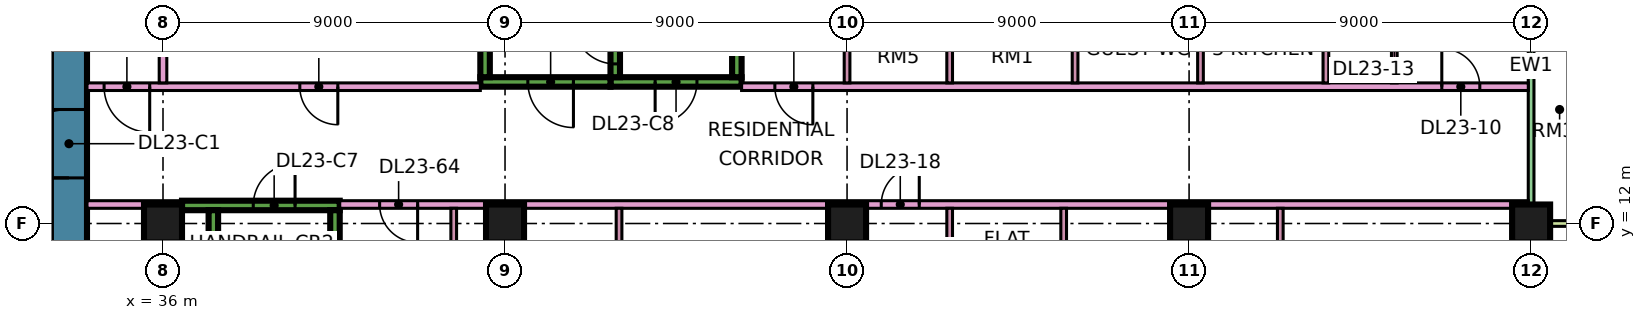
"""IFC4 building model, lengths in metres.
Left out: names, types, materials, properties, quantities, classifications, styles, units other than length and angle.
Written with IfcOpenShell. Run it as: python <this file> out.ifc"""

import sys

from ifc_helpers import new_model, si_unit, direction, frame, frame_2d, origin, origin_2d, place, context, subcontext, project, spatial, rectangle, extrude, element, fill, save


model = new_model("IFC4")
c1 = context("Model", 3, precision=1e-05, world=origin(), true_north=direction((0.0, 1.0)))
c2 = subcontext(c1, "Body", "Model", "MODEL_VIEW")
j1 = project(units=[si_unit("LENGTHUNIT", "METRE"), si_unit("PLANEANGLEUNIT", "RADIAN")], contexts=[c1])
p1 = place(None, origin())
s1 = spatial("IfcSite", under=j1, at=p1, CompositionType="ELEMENT")
p2 = place(p1, origin())
s2 = spatial("IfcBuilding", under=s1, at=p2, CompositionType="ELEMENT")
p3 = place(p2, frame((0.0, 0.0, 103.15)))
s3 = spatial("IfcBuildingStorey", under=s2, at=p3, CompositionType="ELEMENT", Elevation=103.15)
for number, where, z_axis, x_axis in (
    (1, (36.0, 12.0, 0.0), (0.0, 0.0, 1.0), (1.0, 0.0, 0.0)),
    (2, (45.0, 12.0, 0.0), (0.0, 0.0, 1.0), (1.0, 0.0, 0.0)),
    (3, (54.0, 12.0, 0.0), (0.0, 0.0, 1.0), (1.0, 0.0, 0.0)),
    (4, (63.0, 12.0, 0.0), (0.0, 0.0, 1.0), (1.0, 0.0, 0.0)),
    (5, (72.0, 12.0, 0.0), (0.0, 0.0, 1.0), (1.0, 0.0, 0.0)),
):
    element("IfcColumn", number, at=place(p3, frame(where, z_axis=z_axis, x_axis=x_axis)), inside=s3, PredefinedType="COLUMN", context=c2, shape_type="SweptSolid", body=[
        extrude(rectangle(XDim=1.0, YDim=1.0, at=origin_2d()), origin(), (0.0, 0.0, 1.0), 3.75),
    ])
p4 = place(p3, frame((33.525, 7.95, 0.0), z_axis=(0.0, 0.0, 1.0), x_axis=(0.0, 1.0, 0.0)))
e6 = element("IfcWall", 6, at=p4, inside=s3, PredefinedType="SHEAR", context=c2, shape_type="SweptSolid", body=[
    extrude(rectangle(XDim=11.1, YDim=0.95, at=frame_2d((5.55, 0.0))), origin(), (0.0, 0.0, 1.0), 3.75),
])
p5 = place(p4, frame((5.25, 0.0, 0.0)))
e7 = element("IfcOpeningElement", 7, at=p5, cuts=e6, PredefinedType="OPENING", context=c2, shape_type="SweptSolid", body=[
    extrude(rectangle(XDim=1.8, YDim=2.4, at=frame_2d((0.9, 1.2))), frame((0.0, 0.485, 0.0), z_axis=(0.0, -1.0, 0.0), x_axis=(1.0, 0.0, 0.0)), (0.0, 0.0, 1.0), 0.97),
])
p6 = place(p3, frame((36.5, 12.475, 0.0), z_axis=(0.0, 0.0, 1.0), x_axis=(1.0, 0.0, 0.0)))
e8 = element("IfcWall", 8, at=p6, inside=s3, PredefinedType="SHEAR", context=c2, shape_type="SweptSolid", body=[
    extrude(rectangle(XDim=4.15, YDim=0.25, at=frame_2d((2.075, 0.0))), origin(), (0.0, 0.0, 1.0), 3.75),
])
p7 = place(p6, frame((1.875, 0.0, 0.0)))
e9 = element("IfcOpeningElement", 9, at=p7, cuts=e8, PredefinedType="OPENING", context=c2, shape_type="SweptSolid", body=[
    extrude(rectangle(XDim=1.1, YDim=2.2, at=frame_2d((0.55, 1.1))), frame((0.0, 0.135, 0.0), z_axis=(0.0, -1.0, 0.0), x_axis=(1.0, 0.0, 0.0)), (0.0, 0.0, 1.0), 0.27),
])
for number, where, z_axis, x_axis in (
    (10, (37.325, 5.85, 0.0), (0.0, 0.0, 1.0), (0.0, 1.0, 0.0)),
    (11, (40.525, 5.85, 0.0), (0.0, 0.0, 1.0), (0.0, 1.0, 0.0)),
):
    element("IfcWall", number, at=place(p3, frame(where, z_axis=z_axis, x_axis=x_axis)), inside=s3, PredefinedType="SHEAR", context=c2, shape_type="SweptSolid", body=[
        extrude(rectangle(XDim=6.5, YDim=0.25, at=frame_2d((3.25, 0.0))), origin(), (0.0, 0.0, 1.0), 3.75),
    ])
p8 = place(p3, frame((47.775, 15.725, 0.0), z_axis=(0.0, 0.0, 1.0), x_axis=(1.0, 0.0, 0.0)))
e12 = element("IfcWall", 12, at=p8, inside=s3, PredefinedType="SHEAR", context=c2, shape_type="SweptSolid", body=[
    extrude(rectangle(XDim=3.45, YDim=0.25, at=frame_2d((1.725, 0.0))), origin(), (0.0, 0.0, 1.0), 3.75),
])
p9 = place(p8, frame((1.175, 0.0, 0.0)))
e13 = element("IfcOpeningElement", 13, at=p9, cuts=e12, PredefinedType="OPENING", context=c2, shape_type="SweptSolid", body=[
    extrude(rectangle(XDim=1.1, YDim=2.2, at=frame_2d((0.55, 1.1))), frame((0.0, 0.135, 0.0), z_axis=(0.0, -1.0, 0.0), x_axis=(1.0, 0.0, 0.0)), (0.0, 0.0, 1.0), 0.27),
])
p10 = place(p3, frame((47.9, 15.85, 0.0), z_axis=(0.0, 0.0, 1.0), x_axis=(0.0, 1.0, 0.0)))
e14 = element("IfcWall", 14, at=p10, inside=s3, PredefinedType="SHEAR", context=c2, shape_type="SweptSolid", body=[
    extrude(rectangle(XDim=6.5, YDim=0.25, at=frame_2d((3.25, 0.0))), origin(), (0.0, 0.0, 1.0), 3.75),
])
p11 = place(p10, frame((0.35, 0.0, 0.0)))
e15 = element("IfcOpeningElement", 15, at=p11, cuts=e14, PredefinedType="OPENING", context=c2, shape_type="SweptSolid", body=[
    extrude(rectangle(XDim=1.1, YDim=2.2, at=frame_2d((0.55, 1.1))), frame((0.0, 0.135, 0.0), z_axis=(0.0, -1.0, 0.0), x_axis=(1.0, 0.0, 0.0)), (0.0, 0.0, 1.0), 0.27),
])
p12 = place(p3, frame((51.1, 15.85, 0.0), z_axis=(0.0, 0.0, 1.0), x_axis=(0.0, 1.0, 0.0)))
e16 = element("IfcWall", 16, at=p12, inside=s3, PredefinedType="SHEAR", context=c2, shape_type="SweptSolid", body=[
    extrude(rectangle(XDim=6.5, YDim=0.25, at=frame_2d((3.25, 0.0))), origin(), (0.0, 0.0, 1.0), 3.75),
])
p13 = place(p3, frame((44.35, 15.725, 0.0), z_axis=(0.0, 0.0, 1.0), x_axis=(1.0, 0.0, 0.0)))
e17 = element("IfcWall", 17, at=p13, inside=s3, PredefinedType="SHEAR", context=c2, shape_type="SweptSolid", body=[
    extrude(rectangle(XDim=3.425, YDim=0.25, at=frame_2d((1.712, 0.0))), origin(), (0.0, 0.0, 1.0), 3.75),
])
p14 = place(p13, frame((1.25, 0.0, 0.0)))
e18 = element("IfcOpeningElement", 18, at=p14, cuts=e17, PredefinedType="OPENING", context=c2, shape_type="SweptSolid", body=[
    extrude(rectangle(XDim=1.2, YDim=2.2, at=frame_2d((0.6, 1.1))), frame((0.0, 0.135, 0.0), z_axis=(0.0, -1.0, 0.0), x_axis=(1.0, 0.0, 0.0)), (0.0, 0.0, 1.0), 0.27),
])
p15 = place(p3, frame((44.475, 15.85, 0.0), z_axis=(0.0, 0.0, 1.0), x_axis=(0.0, 1.0, 0.0)))
e19 = element("IfcWall", 19, at=p15, inside=s3, PredefinedType="SHEAR", context=c2, shape_type="SweptSolid", body=[
    extrude(rectangle(XDim=6.5, YDim=0.25, at=frame_2d((3.25, 0.0))), origin(), (0.0, 0.0, 1.0), 3.75),
])
p16 = place(p15, frame((1.75, 0.0, 0.0)))
e20 = element("IfcOpeningElement", 20, at=p16, cuts=e19, PredefinedType="OPENING", context=c2, shape_type="SweptSolid", body=[
    extrude(rectangle(XDim=1.1, YDim=2.2, at=frame_2d((0.55, 1.1))), frame((0.0, 0.135, 0.0), z_axis=(0.0, -1.0, 0.0), x_axis=(1.0, 0.0, 0.0)), (0.0, 0.0, 1.0), 0.27),
])
p17 = place(p15, frame((4.3, 0.0, 0.0)))
e21 = element("IfcOpeningElement", 21, at=p17, cuts=e19, PredefinedType="OPENING", context=c2, shape_type="SweptSolid", body=[
    extrude(rectangle(XDim=1.1, YDim=2.2, at=frame_2d((0.55, 1.1))), frame((0.0, 0.135, 0.0), z_axis=(0.0, -1.0, 0.0), x_axis=(1.0, 0.0, 0.0)), (0.0, 0.0, 1.0), 0.27),
])
p18 = place(p3, frame((72.0, 12.075, 0.0), z_axis=(0.0, 0.0, 1.0), x_axis=(0.0, 1.0, 0.0)))
e22 = element("IfcWall", 22, at=p18, inside=s3, PredefinedType="SOLIDWALL", context=c2, shape_type="SweptSolid", body=[
    extrude(rectangle(XDim=10.35, YDim=0.15, at=frame_2d((5.175, 0.0))), origin(), (0.0, 0.0, 1.0), 3.35),
])
p19 = place(p18, frame((4.575, 0.0, 0.0)))
e23 = element("IfcOpeningElement", 23, at=p19, cuts=e22, PredefinedType="OPENING", context=c2, shape_type="SweptSolid", body=[
    extrude(rectangle(XDim=1.8, YDim=2.4, at=frame_2d((0.9, 1.2))), frame((0.0, 0.085, 0.0), z_axis=(0.0, -1.0, 0.0), x_axis=(1.0, 0.0, 0.0)), (0.0, 0.0, 1.0), 0.17),
])
p20 = place(p18, frame((7.988, 0.0, 0.45)))
e24 = element("IfcOpeningElement", 24, at=p20, cuts=e22, PredefinedType="OPENING", context=c2, shape_type="SweptSolid", body=[
    extrude(rectangle(XDim=1.8, YDim=2.4, at=frame_2d((0.9, 1.2))), frame((0.0, 0.085, 0.0), z_axis=(0.0, -1.0, 0.0), x_axis=(1.0, 0.0, 0.0)), (0.0, 0.0, 1.0), 0.17),
])
p21 = place(p3, frame((73.5, 12.0, 0.0), z_axis=(0.0, 0.0, 1.0), x_axis=(-1.0, 0.0, 0.0)))
e25 = element("IfcWall", 25, at=p21, inside=s3, PredefinedType="SOLIDWALL", context=c2, shape_type="SweptSolid", body=[
    extrude(rectangle(XDim=1.5, YDim=0.15, at=frame_2d((0.75, 0.0))), origin(), (0.0, 0.0, 1.0), 3.35),
])
p22 = place(p3, frame((34.0, 12.5, 0.0), z_axis=(0.0, 0.0, 1.0), x_axis=(1.0, 0.0, 0.0)))
e26 = element("IfcWall", 26, at=p22, inside=s3, PredefinedType="PARTITIONING", context=c2, shape_type="SweptSolid", body=[
    extrude(rectangle(XDim=2.501, YDim=0.2, at=frame_2d((1.25, 0.0))), origin(), (0.0, 0.0, 1.0), 3.35),
])
p23 = place(p3, frame((34.0, 15.6, 0.0), z_axis=(0.0, 0.0, 1.0), x_axis=(1.0, 0.0, 0.0)))
e27 = element("IfcWall", 27, at=p23, inside=s3, PredefinedType="PARTITIONING", context=c2, shape_type="SweptSolid", body=[
    extrude(rectangle(XDim=10.35, YDim=0.2, at=frame_2d((5.175, 0.0))), origin(), (0.0, 0.0, 1.0), 3.35),
])
p24 = place(p23, frame((5.6, 0.0, 0.0)))
e28 = element("IfcOpeningElement", 28, at=p24, cuts=e27, PredefinedType="OPENING", context=c2, shape_type="SweptSolid", body=[
    extrude(rectangle(XDim=1.0, YDim=2.1, at=frame_2d((0.5, 1.05))), frame((0.0, 0.11, 0.0), z_axis=(0.0, -1.0, 0.0), x_axis=(1.0, 0.0, 0.0)), (0.0, 0.0, 1.0), 0.22),
])
p25 = place(p23, frame((0.45, 0.0, 0.0)))
e29 = element("IfcOpeningElement", 29, at=p25, cuts=e27, PredefinedType="OPENING", context=c2, shape_type="SweptSolid", body=[
    extrude(rectangle(XDim=1.2, YDim=2.1, at=frame_2d((0.6, 1.05))), frame((0.0, 0.11, 0.0), z_axis=(0.0, -1.0, 0.0), x_axis=(1.0, 0.0, 0.0)), (0.0, 0.0, 1.0), 0.22),
])
p26 = place(p3, frame((36.0, 15.7, 0.0), z_axis=(0.0, 0.0, 1.0), x_axis=(0.0, 1.0, 0.0)))
e30 = element("IfcWall", 30, at=p26, inside=s3, PredefinedType="PARTITIONING", context=c2, shape_type="SweptSolid", body=[
    extrude(rectangle(XDim=8.3, YDim=0.2, at=frame_2d((4.15, 0.0))), origin(), (0.0, 0.0, 1.0), 3.35),
])
p27 = place(p3, frame((40.65, 12.5, 0.0), z_axis=(0.0, 0.0, 1.0), x_axis=(1.0, 0.0, 0.0)))
e31 = element("IfcWall", 31, at=p27, inside=s3, PredefinedType="PARTITIONING", context=c2, shape_type="SweptSolid", body=[
    extrude(rectangle(XDim=31.276, YDim=0.2, at=frame_2d((15.638, 0.0))), origin(), (0.0, 0.0, 1.0), 3.35),
])
p28 = place(p27, frame((14.25, 0.0, 0.0)))
e32 = element("IfcOpeningElement", 32, at=p28, cuts=e31, PredefinedType="OPENING", context=c2, shape_type="SweptSolid", body=[
    extrude(rectangle(XDim=1.0, YDim=2.1, at=frame_2d((0.5, 1.05))), frame((0.0, 0.11, 0.0), z_axis=(0.0, -1.0, 0.0), x_axis=(1.0, 0.0, 0.0)), (0.0, 0.0, 1.0), 0.22),
])
p29 = place(p27, frame((1.05, 0.0, 0.0)))
e33 = element("IfcOpeningElement", 33, at=p29, cuts=e31, PredefinedType="OPENING", context=c2, shape_type="SweptSolid", body=[
    extrude(rectangle(XDim=1.0, YDim=2.1, at=frame_2d((0.5, 1.05))), frame((0.0, 0.11, 0.0), z_axis=(0.0, -1.0, 0.0), x_axis=(1.0, 0.0, 0.0)), (0.0, 0.0, 1.0), 0.22),
])
p30 = place(p3, frame((43.65, 5.975, 0.0), z_axis=(0.0, 0.0, 1.0), x_axis=(0.0, 1.0, 0.0)))
e34 = element("IfcWall", 34, at=p30, inside=s3, PredefinedType="PARTITIONING", context=c2, shape_type="SweptSolid", body=[
    extrude(rectangle(XDim=6.425, YDim=0.15, at=frame_2d((3.212, 0.0))), origin(), (0.0, 0.0, 1.0), 3.35),
])
p31 = place(p30, frame((4.275, 0.0, 0.0)))
e35 = element("IfcOpeningElement", 35, at=p31, cuts=e34, PredefinedType="OPENING", context=c2, shape_type="SweptSolid", body=[
    extrude(rectangle(XDim=0.9, YDim=2.1, at=frame_2d((0.45, 1.05))), frame((0.0, 0.085, 0.0), z_axis=(0.0, -1.0, 0.0), x_axis=(1.0, 0.0, 0.0)), (0.0, 0.0, 1.0), 0.17),
])
p32 = place(p3, frame((48.0, 5.975, 0.0), z_axis=(0.0, 0.0, 1.0), x_axis=(0.0, 1.0, 0.0)))
e36 = element("IfcWall", 36, at=p32, inside=s3, PredefinedType="PARTITIONING", context=c2, shape_type="SweptSolid", body=[
    extrude(rectangle(XDim=6.425, YDim=0.15, at=frame_2d((3.212, 0.0))), origin(), (0.0, 0.0, 1.0), 3.35),
])
p33 = place(p3, frame((51.225, 15.6, 0.0), z_axis=(0.0, 0.0, 1.0), x_axis=(1.0, 0.0, 0.0)))
e37 = element("IfcWall", 37, at=p33, inside=s3, PredefinedType="PARTITIONING", context=c2, shape_type="SweptSolid", body=[
    extrude(rectangle(XDim=20.701, YDim=0.2, at=frame_2d((10.351, 0.0))), origin(), (0.0, 0.0, 1.0), 3.35),
])
p34 = place(p33, frame((18.425, 0.0, 0.0)))
e38 = element("IfcOpeningElement", 38, at=p34, cuts=e37, PredefinedType="OPENING", context=c2, shape_type="SweptSolid", body=[
    extrude(rectangle(XDim=1.0, YDim=2.1, at=frame_2d((0.5, 1.05))), frame((0.0, 0.11, 0.0), z_axis=(0.0, -1.0, 0.0), x_axis=(1.0, 0.0, 0.0)), (0.0, 0.0, 1.0), 0.22),
])
p35 = place(p33, frame((0.875, 0.0, 0.0)))
e39 = element("IfcOpeningElement", 39, at=p35, cuts=e37, PredefinedType="OPENING", context=c2, shape_type="SweptSolid", body=[
    extrude(rectangle(XDim=1.0, YDim=2.1, at=frame_2d((0.5, 1.05))), frame((0.0, 0.11, 0.0), z_axis=(0.0, -1.0, 0.0), x_axis=(1.0, 0.0, 0.0)), (0.0, 0.0, 1.0), 0.22),
])
p36 = place(p3, frame((54.0, -1.351, 0.0), z_axis=(0.0, 0.0, 1.0), x_axis=(0.0, 1.0, 0.0)))
e40 = element("IfcWall", 40, at=p36, inside=s3, PredefinedType="PARTITIONING", context=c2, shape_type="SweptSolid", body=[
    extrude(rectangle(XDim=13.751, YDim=0.2, at=frame_2d((6.875, 0.0))), origin(), (0.0, 0.0, 1.0), 3.35),
])
p37 = place(p3, frame((54.0, 15.7, 0.0), z_axis=(0.0, 0.0, 1.0), x_axis=(0.0, 1.0, 0.0)))
e41 = element("IfcWall", 41, at=p37, inside=s3, PredefinedType="PARTITIONING", context=c2, shape_type="SweptSolid", body=[
    extrude(rectangle(XDim=2.6, YDim=0.15, at=frame_2d((1.3, 0.0))), origin(), (0.0, 0.0, 1.0), 3.35),
])
p38 = place(p3, frame((56.7, 8.375, 0.0), z_axis=(0.0, 0.0, 1.0), x_axis=(0.0, 1.0, 0.0)))
e42 = element("IfcWall", 42, at=p38, inside=s3, PredefinedType="PARTITIONING", context=c2, shape_type="SweptSolid", body=[
    extrude(rectangle(XDim=4.025, YDim=0.15, at=frame_2d((2.012, 0.0))), origin(), (0.0, 0.0, 1.0), 3.35),
])
p39 = place(p38, frame((1.575, 0.0, 0.0)))
e43 = element("IfcOpeningElement", 43, at=p39, cuts=e42, PredefinedType="OPENING", context=c2, shape_type="SweptSolid", body=[
    extrude(rectangle(XDim=0.8, YDim=2.1, at=frame_2d((0.4, 1.05))), frame((0.0, 0.085, 0.0), z_axis=(0.0, -1.0, 0.0), x_axis=(1.0, 0.0, 0.0)), (0.0, 0.0, 1.0), 0.17),
])
p40 = place(p3, frame((56.7, 15.7, 0.0), z_axis=(0.0, 0.0, 1.0), x_axis=(0.0, 1.0, 0.0)))
e44 = element("IfcWall", 44, at=p40, inside=s3, PredefinedType="PARTITIONING", context=c2, shape_type="SweptSolid", body=[
    extrude(rectangle(XDim=2.525, YDim=0.15, at=frame_2d((1.263, 0.0))), origin(), (0.0, 0.0, 1.0), 3.35),
])
p41 = place(p3, frame((59.7, 8.375, 0.0), z_axis=(0.0, 0.0, 1.0), x_axis=(0.0, 1.0, 0.0)))
e45 = element("IfcWall", 45, at=p41, inside=s3, PredefinedType="PARTITIONING", context=c2, shape_type="SweptSolid", body=[
    extrude(rectangle(XDim=4.025, YDim=0.15, at=frame_2d((2.012, 0.0))), origin(), (0.0, 0.0, 1.0), 3.35),
])
p42 = place(p3, frame((60.0, 15.7, 0.0), z_axis=(0.0, 0.0, 1.0), x_axis=(0.0, 1.0, 0.0)))
e46 = element("IfcWall", 46, at=p42, inside=s3, PredefinedType="PARTITIONING", context=c2, shape_type="SweptSolid", body=[
    extrude(rectangle(XDim=2.525, YDim=0.15, at=frame_2d((1.263, 0.0))), origin(), (0.0, 0.0, 1.0), 3.35),
])
p43 = place(p3, frame((63.3, 8.375, 0.0), z_axis=(0.0, 0.0, 1.0), x_axis=(0.0, 1.0, 0.0)))
e47 = element("IfcWall", 47, at=p43, inside=s3, PredefinedType="PARTITIONING", context=c2, shape_type="SweptSolid", body=[
    extrude(rectangle(XDim=4.025, YDim=0.15, at=frame_2d((2.012, 0.0))), origin(), (0.0, 0.0, 1.0), 3.35),
])
p44 = place(p3, frame((63.3, 15.7, 0.0), z_axis=(0.0, 0.0, 1.0), x_axis=(0.0, 1.0, 0.0)))
e48 = element("IfcWall", 48, at=p44, inside=s3, PredefinedType="PARTITIONING", context=c2, shape_type="SweptSolid", body=[
    extrude(rectangle(XDim=2.525, YDim=0.15, at=frame_2d((1.263, 0.0))), origin(), (0.0, 0.0, 1.0), 3.35),
])
p45 = place(p3, frame((65.4, 8.375, 0.0), z_axis=(0.0, 0.0, 1.0), x_axis=(0.0, 1.0, 0.0)))
e49 = element("IfcWall", 49, at=p45, inside=s3, PredefinedType="PARTITIONING", context=c2, shape_type="SweptSolid", body=[
    extrude(rectangle(XDim=4.025, YDim=0.15, at=frame_2d((2.012, 0.0))), origin(), (0.0, 0.0, 1.0), 3.35),
])
p46 = place(p3, frame((66.6, 15.7, 0.0), z_axis=(0.0, 0.0, 1.0), x_axis=(0.0, 1.0, 0.0)))
e50 = element("IfcWall", 50, at=p46, inside=s3, PredefinedType="PARTITIONING", context=c2, shape_type="SweptSolid", body=[
    extrude(rectangle(XDim=2.525, YDim=0.15, at=frame_2d((1.263, 0.0))), origin(), (0.0, 0.0, 1.0), 3.35),
])
p47 = place(p3, frame((68.4, 15.7, 0.0), z_axis=(0.0, 0.0, 1.0), x_axis=(0.0, 1.0, 0.0)))
e51 = element("IfcWall", 51, at=p47, inside=s3, PredefinedType="PARTITIONING", context=c2, shape_type="SweptSolid", body=[
    extrude(rectangle(XDim=2.525, YDim=0.15, at=frame_2d((1.263, 0.0))), origin(), (0.0, 0.0, 1.0), 3.35),
])
p48 = place(p47, frame((0.9, 0.0, 0.0)))
e52 = element("IfcOpeningElement", 52, at=p48, cuts=e51, PredefinedType="OPENING", context=c2, shape_type="SweptSolid", body=[
    extrude(rectangle(XDim=0.8, YDim=2.1, at=frame_2d((0.4, 1.05))), frame((0.0, 0.085, 0.0), z_axis=(0.0, -1.0, 0.0), x_axis=(1.0, 0.0, 0.0)), (0.0, 0.0, 1.0), 0.17),
])
p49 = place(p5, origin())
e53 = element("IfcDoor", 53, at=p49, inside=s3, OperationType="DOUBLE_DOOR_SINGLE_SWING", PredefinedType="DOOR", context=c2, shape_type="SweptSolid", body=[
    extrude(rectangle(XDim=1.8, YDim=2.4, at=frame_2d((0.9, 1.2))), frame((0.0, 0.025, 0.0), z_axis=(0.0, -1.0, 0.0), x_axis=(1.0, 0.0, 0.0)), (0.0, 0.0, 1.0), 0.05),
])
fill(e7, e53)
p50 = place(p7, frame((1.1, 0.0, 0.0), z_axis=(0.0, 0.0, 1.0), x_axis=(-1.0, 0.0, 0.0)))
e54 = element("IfcDoor", 54, at=p50, inside=s3, OperationType="SINGLE_SWING_RIGHT", PredefinedType="DOOR", context=c2, shape_type="SweptSolid", body=[
    extrude(rectangle(XDim=1.1, YDim=2.2, at=frame_2d((0.55, 1.1))), frame((0.0, 0.025, 0.0), z_axis=(0.0, -1.0, 0.0), x_axis=(1.0, 0.0, 0.0)), (0.0, 0.0, 1.0), 0.05),
])
fill(e9, e54)
p51 = place(p9, frame((1.1, 0.0, 0.0), z_axis=(0.0, 0.0, 1.0), x_axis=(-1.0, 0.0, 0.0)))
e55 = element("IfcDoor", 55, at=p51, inside=s3, OperationType="SINGLE_SWING_LEFT", PredefinedType="DOOR", context=c2, shape_type="SweptSolid", body=[
    extrude(rectangle(XDim=1.1, YDim=2.2, at=frame_2d((0.55, 1.1))), frame((0.0, 0.025, 0.0), z_axis=(0.0, -1.0, 0.0), x_axis=(1.0, 0.0, 0.0)), (0.0, 0.0, 1.0), 0.05),
])
fill(e13, e55)
p52 = place(p14, origin())
e56 = element("IfcDoor", 56, at=p52, inside=s3, OperationType="SINGLE_SWING_RIGHT", PredefinedType="DOOR", context=c2, shape_type="SweptSolid", body=[
    extrude(rectangle(XDim=1.2, YDim=2.2, at=frame_2d((0.6, 1.1))), frame((0.0, 0.025, 0.0), z_axis=(0.0, -1.0, 0.0), x_axis=(1.0, 0.0, 0.0)), (0.0, 0.0, 1.0), 0.05),
])
fill(e18, e56)
p53 = place(p11, frame((1.1, 0.0, 0.0), z_axis=(0.0, 0.0, 1.0), x_axis=(-1.0, 0.0, 0.0)))
e57 = element("IfcDoor", 57, at=p53, inside=s3, OperationType="SINGLE_SWING_RIGHT", PredefinedType="DOOR", context=c2, shape_type="SweptSolid", body=[
    extrude(rectangle(XDim=1.1, YDim=2.2, at=frame_2d((0.55, 1.1))), frame((0.0, 0.025, 0.0), z_axis=(0.0, -1.0, 0.0), x_axis=(1.0, 0.0, 0.0)), (0.0, 0.0, 1.0), 0.05),
])
fill(e15, e57)
p54 = place(p24, origin())
e58 = element("IfcDoor", 58, at=p54, inside=s3, OperationType="SINGLE_SWING_RIGHT", PredefinedType="DOOR", context=c2, shape_type="SweptSolid", body=[
    extrude(rectangle(XDim=1.0, YDim=2.1, at=frame_2d((0.5, 1.05))), frame((0.0, 0.025, 0.0), z_axis=(0.0, -1.0, 0.0), x_axis=(1.0, 0.0, 0.0)), (0.0, 0.0, 1.0), 0.05),
])
fill(e28, e58)
p55 = place(p34, origin())
e59 = element("IfcDoor", 59, at=p55, inside=s3, OperationType="SINGLE_SWING_LEFT", PredefinedType="DOOR", context=c2, shape_type="SweptSolid", body=[
    extrude(rectangle(XDim=1.0, YDim=2.1, at=frame_2d((0.5, 1.05))), frame((0.0, 0.025, 0.0), z_axis=(0.0, -1.0, 0.0), x_axis=(1.0, 0.0, 0.0)), (0.0, 0.0, 1.0), 0.05),
])
fill(e38, e59)
p56 = place(p28, frame((1.0, 0.0, 0.0), z_axis=(0.0, 0.0, 1.0), x_axis=(-1.0, 0.0, 0.0)))
e60 = element("IfcDoor", 60, at=p56, inside=s3, OperationType="SINGLE_SWING_RIGHT", PredefinedType="DOOR", context=c2, shape_type="SweptSolid", body=[
    extrude(rectangle(XDim=1.0, YDim=2.1, at=frame_2d((0.5, 1.05))), frame((0.0, 0.025, 0.0), z_axis=(0.0, -1.0, 0.0), x_axis=(1.0, 0.0, 0.0)), (0.0, 0.0, 1.0), 0.05),
])
fill(e32, e60)
p57 = place(p25, origin())
e61 = element("IfcDoor", 61, at=p57, inside=s3, OperationType="SINGLE_SWING_RIGHT", PredefinedType="DOOR", context=c2, shape_type="SweptSolid", body=[
    extrude(rectangle(XDim=1.2, YDim=2.1, at=frame_2d((0.6, 1.05))), frame((0.0, 0.025, 0.0), z_axis=(0.0, -1.0, 0.0), x_axis=(1.0, 0.0, 0.0)), (0.0, 0.0, 1.0), 0.05),
])
fill(e29, e61)
p58 = place(p35, origin())
e62 = element("IfcDoor", 62, at=p58, inside=s3, OperationType="SINGLE_SWING_RIGHT", PredefinedType="DOOR", context=c2, shape_type="SweptSolid", body=[
    extrude(rectangle(XDim=1.0, YDim=2.1, at=frame_2d((0.5, 1.05))), frame((0.0, 0.025, 0.0), z_axis=(0.0, -1.0, 0.0), x_axis=(1.0, 0.0, 0.0)), (0.0, 0.0, 1.0), 0.05),
])
fill(e39, e62)
p59 = place(p29, origin())
e63 = element("IfcDoor", 63, at=p59, inside=s3, OperationType="SINGLE_SWING_RIGHT", PredefinedType="DOOR", context=c2, shape_type="SweptSolid", body=[
    extrude(rectangle(XDim=1.0, YDim=2.1, at=frame_2d((0.5, 1.05))), frame((0.0, 0.025, 0.0), z_axis=(0.0, -1.0, 0.0), x_axis=(1.0, 0.0, 0.0)), (0.0, 0.0, 1.0), 0.05),
])
fill(e33, e63)
save(model, sys.argv[1])
